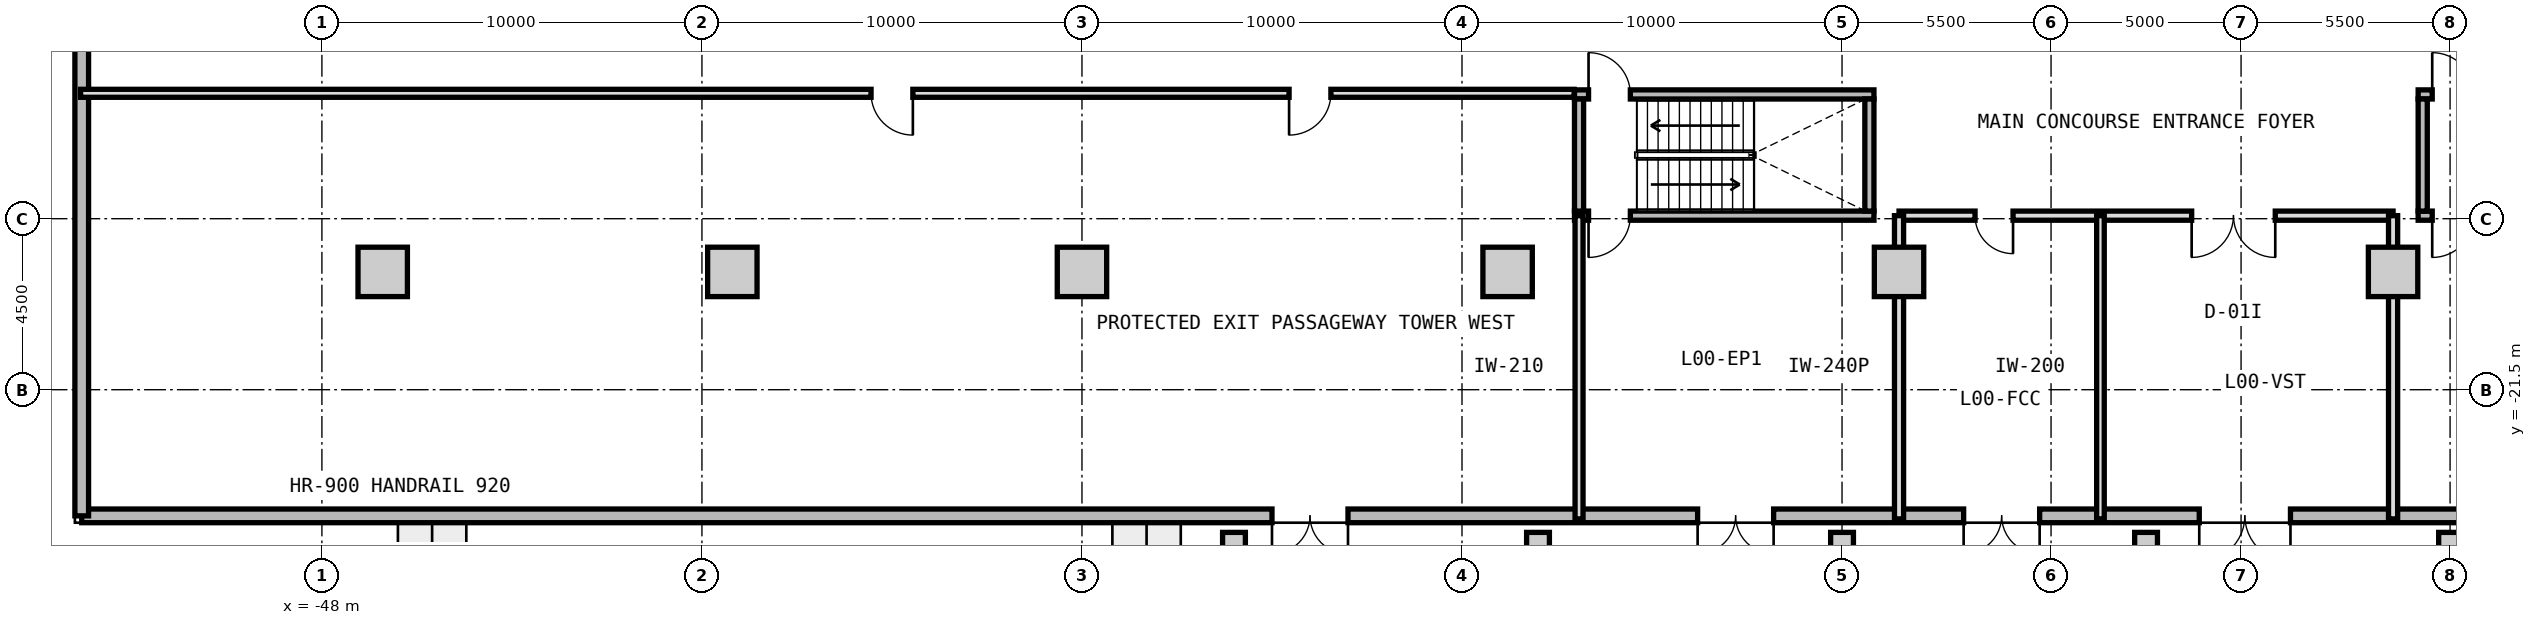
"""IFC4 building model, lengths in metres.
Left out: names, types, materials, properties, quantities, classifications, styles, units other than length and angle.
Written with IfcOpenShell. Run it as: python <this file> out.ifc"""

import sys

from ifc_helpers import new_model, si_unit, direction, frame, frame_2d, origin, origin_2d, place, context, subcontext, project, spatial, rectangle, extrude, source, transform, mapped, element, fill, save


model = new_model("IFC4")
c1 = context("Model", 3, precision=1e-05, world=origin(), true_north=direction((0.0, 1.0)))
c2 = subcontext(c1, "Body", "Model", "MODEL_VIEW")
j1 = project(units=[si_unit("LENGTHUNIT", "METRE"), si_unit("PLANEANGLEUNIT", "RADIAN")], contexts=[c1])
p1 = place(None, origin())
s1 = spatial("IfcSite", under=j1, at=p1, CompositionType="ELEMENT")
p2 = place(p1, origin())
s2 = spatial("IfcBuilding", under=s1, at=p2, CompositionType="ELEMENT")
p3 = place(p2, origin())
s3 = spatial("IfcBuildingStorey", under=s2, at=p3, CompositionType="ELEMENT", Elevation=0.0)
m1 = source(origin(), c2, "Body", "SweptSolid", [
    extrude(rectangle(XDim=1.3, YDim=1.3, at=origin_2d()), origin(), (0.0, 0.0, 1.0), 4.2),
])
for number, where, z_axis, x_axis in (
    (1, (-46.4, -18.4, 0.0), (0.0, 0.0, 1.0), (1.0, 0.0, 0.0)),
    (2, (-37.2, -18.4, 0.0), (0.0, 0.0, 1.0), (1.0, 0.0, 0.0)),
    (3, (-28.0, -18.4, 0.0), (0.0, 0.0, 1.0), (1.0, 0.0, 0.0)),
    (4, (-16.8, -18.4, 0.0), (0.0, 0.0, 1.0), (1.0, 0.0, 0.0)),
    (5, (-6.5, -18.4, 0.0), (0.0, 0.0, 1.0), (1.0, 0.0, 0.0)),
    (6, (6.5, -18.4, 0.0), (0.0, 0.0, 1.0), (1.0, 0.0, 0.0)),
):
    element("IfcColumn", number, at=place(p3, frame(where, z_axis=z_axis, x_axis=x_axis)), inside=s3, PredefinedType="COLUMN", context=c2, shape_type="MappedRepresentation", body=[
        mapped(m1, transform((0.0, 0.0, 0.0), x_axis=(1.0, 0.0, 0.0), y_axis=(0.0, 1.0, 0.0), z_axis=(0.0, 0.0, 1.0), scale=1.0)),
    ])
m2 = source(origin(), c2, "Body", "SweptSolid", [
    extrude(rectangle(XDim=0.6, YDim=0.45, at=origin_2d()), origin(), (0.0, 0.0, 1.0), 4.2),
])
for number, where, z_axis, x_axis in (
    (7, (-24.0, -25.48, 0.0), (0.0, 0.0, 1.0), (1.0, 0.0, 0.0)),
    (8, (-16.0, -25.48, 0.0), (0.0, 0.0, 1.0), (1.0, 0.0, 0.0)),
    (9, (-8.0, -25.48, 0.0), (0.0, 0.0, 1.0), (1.0, 0.0, 0.0)),
    (10, (0.0, -25.48, 0.0), (0.0, 0.0, 1.0), (1.0, 0.0, 0.0)),
    (11, (8.0, -25.48, 0.0), (0.0, 0.0, 1.0), (1.0, 0.0, 0.0)),
):
    element("IfcColumn", number, at=place(p3, frame(where, z_axis=z_axis, x_axis=x_axis)), inside=s3, PredefinedType="PILASTER", context=c2, shape_type="MappedRepresentation", body=[
        mapped(m2, transform((0.0, 0.0, 0.0), x_axis=(1.0, 0.0, 0.0), y_axis=(0.0, 1.0, 0.0), z_axis=(0.0, 0.0, 1.0), scale=1.0)),
    ])
m3 = source(origin(), c2, "Body", "SweptSolid", [
    extrude(rectangle(XDim=108.64, YDim=0.36, at=frame_2d((54.32, 0.0))), origin(), (0.0, 0.0, 1.0), 3.88),
])
p4 = place(p3, frame((54.32, -24.82, 0.0), z_axis=(0.0, 0.0, 1.0), x_axis=(-1.0, 0.0, 0.0)))
e12 = element("IfcWall", 12, at=p4, inside=s3, PredefinedType="SOLIDWALL", context=c2, shape_type="MappedRepresentation", body=[
    mapped(m3, transform((0.0, 0.0, 0.0), x_axis=(1.0, 0.0, 0.0), y_axis=(0.0, 1.0, 0.0), z_axis=(0.0, 0.0, 1.0), scale=1.0)),
])
p5 = place(p4, frame((50.52, 0.0, 0.0)))
e13 = element("IfcOpeningElement", 13, at=p5, cuts=e12, PredefinedType="OPENING", context=c2, shape_type="SweptSolid", body=[
    extrude(rectangle(XDim=2.4, YDim=2.6, at=frame_2d((1.2, 1.3))), frame((0.0, 0.19, 0.0), z_axis=(0.0, -1.0, 0.0), x_axis=(1.0, 0.0, 0.0)), (0.0, 0.0, 1.0), 0.38),
])
p6 = place(p4, frame((57.12, 0.0, 0.0)))
e14 = element("IfcOpeningElement", 14, at=p6, cuts=e12, PredefinedType="OPENING", context=c2, shape_type="SweptSolid", body=[
    extrude(rectangle(XDim=2.0, YDim=2.3, at=frame_2d((1.0, 1.15))), frame((0.0, 0.19, 0.0), z_axis=(0.0, -1.0, 0.0), x_axis=(1.0, 0.0, 0.0)), (0.0, 0.0, 1.0), 0.38),
])
p7 = place(p4, frame((42.52, 0.0, 0.0)))
e15 = element("IfcOpeningElement", 15, at=p7, cuts=e12, PredefinedType="OPENING", context=c2, shape_type="SweptSolid", body=[
    extrude(rectangle(XDim=2.0, YDim=2.3, at=frame_2d((1.0, 1.15))), frame((0.0, 0.19, 0.0), z_axis=(0.0, -1.0, 0.0), x_axis=(1.0, 0.0, 0.0)), (0.0, 0.0, 1.0), 0.38),
])
p8 = place(p4, frame((64.12, 0.0, 0.0)))
e16 = element("IfcOpeningElement", 16, at=p8, cuts=e12, PredefinedType="OPENING", context=c2, shape_type="SweptSolid", body=[
    extrude(rectangle(XDim=2.0, YDim=2.3, at=frame_2d((1.0, 1.15))), frame((0.0, 0.19, 0.0), z_axis=(0.0, -1.0, 0.0), x_axis=(1.0, 0.0, 0.0)), (0.0, 0.0, 1.0), 0.38),
])
p9 = place(p4, frame((75.32, 0.0, 0.0)))
e17 = element("IfcOpeningElement", 17, at=p9, cuts=e12, PredefinedType="OPENING", context=c2, shape_type="SweptSolid", body=[
    extrude(rectangle(XDim=2.0, YDim=2.3, at=frame_2d((1.0, 1.15))), frame((0.0, 0.19, 0.0), z_axis=(0.0, -1.0, 0.0), x_axis=(1.0, 0.0, 0.0)), (0.0, 0.0, 1.0), 0.38),
])
p10 = place(p4, frame((34.12, 0.0, 0.0)))
e18 = element("IfcOpeningElement", 18, at=p10, cuts=e12, PredefinedType="OPENING", context=c2, shape_type="SweptSolid", body=[
    extrude(rectangle(XDim=2.0, YDim=2.3, at=frame_2d((1.0, 1.15))), frame((0.0, 0.19, 0.0), z_axis=(0.0, -1.0, 0.0), x_axis=(1.0, 0.0, 0.0)), (0.0, 0.0, 1.0), 0.38),
])
m4 = source(origin(), c2, "Body", "SweptSolid", [
    extrude(rectangle(XDim=49.64, YDim=0.36, at=frame_2d((24.82, 0.0))), origin(), (0.0, 0.0, 1.0), 3.88),
])
p11 = place(p3, frame((-54.32, -24.82, 0.0), z_axis=(0.0, 0.0, 1.0), x_axis=(0.0, 1.0, 0.0)))
e19 = element("IfcWall", 19, at=p11, inside=s3, PredefinedType="SOLIDWALL", context=c2, shape_type="MappedRepresentation", body=[
    mapped(m4, transform((0.0, 0.0, 0.0), x_axis=(1.0, 0.0, 0.0), y_axis=(0.0, 1.0, 0.0), z_axis=(0.0, 0.0, 1.0), scale=1.0)),
])
p12 = place(p11, frame((14.62, 0.0, 0.0)))
e20 = element("IfcOpeningElement", 20, at=p12, cuts=e19, PredefinedType="OPENING", context=c2, shape_type="SweptSolid", body=[
    extrude(rectangle(XDim=4.2, YDim=2.7, at=frame_2d((2.1, 1.35))), frame((0.0, 0.19, 0.0), z_axis=(0.0, -1.0, 0.0), x_axis=(1.0, 0.0, 0.0)), (0.0, 0.0, 1.0), 0.38),
])
p13 = place(p11, frame((35.12, 0.0, 0.0)))
e21 = element("IfcOpeningElement", 21, at=p13, cuts=e19, PredefinedType="OPENING", context=c2, shape_type="SweptSolid", body=[
    extrude(rectangle(XDim=4.2, YDim=2.7, at=frame_2d((2.1, 1.35))), frame((0.0, 0.19, 0.0), z_axis=(0.0, -1.0, 0.0), x_axis=(1.0, 0.0, 0.0)), (0.0, 0.0, 1.0), 0.38),
])
m5 = source(origin(), c2, "Body", "SweptSolid", [
    extrude(rectangle(XDim=7.88, YDim=0.24, at=frame_2d((3.94, 0.0))), origin(), (0.0, 0.0, 1.0), 3.88),
])
p14 = place(p3, frame((-15.04, -13.73, 0.0), z_axis=(0.0, 0.0, 1.0), x_axis=(1.0, 0.0, 0.0)))
e22 = element("IfcWall", 22, at=p14, inside=s3, PredefinedType="PARTITIONING", context=c2, shape_type="MappedRepresentation", body=[
    mapped(m5, transform((0.0, 0.0, 0.0), x_axis=(1.0, 0.0, 0.0), y_axis=(0.0, 1.0, 0.0), z_axis=(0.0, 0.0, 1.0), scale=1.0)),
])
p15 = place(p14, frame((0.37, 0.0, 0.0)))
e23 = element("IfcOpeningElement", 23, at=p15, cuts=e22, PredefinedType="OPENING", context=c2, shape_type="SweptSolid", body=[
    extrude(rectangle(XDim=1.1, YDim=2.15, at=frame_2d((0.55, 1.075))), frame((0.0, 0.13, 0.0), z_axis=(0.0, -1.0, 0.0), x_axis=(1.0, 0.0, 0.0)), (0.0, 0.0, 1.0), 0.26),
])
p16 = place(p3, frame((-15.04, -16.92, 0.0), z_axis=(0.0, 0.0, 1.0), x_axis=(1.0, 0.0, 0.0)))
e24 = element("IfcWall", 24, at=p16, inside=s3, PredefinedType="PARTITIONING", context=c2, shape_type="MappedRepresentation", body=[
    mapped(m5, transform((0.0, 0.0, 0.0), x_axis=(1.0, 0.0, 0.0), y_axis=(0.0, 1.0, 0.0), z_axis=(0.0, 0.0, 1.0), scale=1.0)),
])
p17 = place(p16, frame((0.37, 0.0, 0.0)))
e25 = element("IfcOpeningElement", 25, at=p17, cuts=e24, PredefinedType="OPENING", context=c2, shape_type="SweptSolid", body=[
    extrude(rectangle(XDim=1.1, YDim=2.15, at=frame_2d((0.55, 1.075))), frame((0.0, 0.13, 0.0), z_axis=(0.0, -1.0, 0.0), x_axis=(1.0, 0.0, 0.0)), (0.0, 0.0, 1.0), 0.26),
])
m6 = source(origin(), c2, "Body", "SweptSolid", [
    extrude(rectangle(XDim=2.95, YDim=0.24, at=frame_2d((1.475, 0.0))), origin(), (0.0, 0.0, 1.0), 3.88),
])
for number, where, z_axis, x_axis in (
    (26, (-14.92, -16.8, 0.0), (0.0, 0.0, 1.0), (0.0, 1.0, 0.0)),
    (27, (-7.28, -16.8, 0.0), (0.0, 0.0, 1.0), (0.0, 1.0, 0.0)),
):
    element("IfcWall", number, at=place(p3, frame(where, z_axis=z_axis, x_axis=x_axis)), inside=s3, PredefinedType="PARTITIONING", context=c2, shape_type="MappedRepresentation", body=[
        mapped(m6, transform((0.0, 0.0, 0.0), x_axis=(1.0, 0.0, 0.0), y_axis=(0.0, 1.0, 0.0), z_axis=(0.0, 0.0, 1.0), scale=1.0)),
    ])
p18 = place(p3, frame((7.16, -13.73, 0.0), z_axis=(0.0, 0.0, 1.0), x_axis=(1.0, 0.0, 0.0)))
e28 = element("IfcWall", 28, at=p18, inside=s3, PredefinedType="PARTITIONING", context=c2, shape_type="MappedRepresentation", body=[
    mapped(m5, transform((0.0, 0.0, 0.0), x_axis=(1.0, 0.0, 0.0), y_axis=(0.0, 1.0, 0.0), z_axis=(0.0, 0.0, 1.0), scale=1.0)),
])
p19 = place(p18, frame((0.37, 0.0, 0.0)))
e29 = element("IfcOpeningElement", 29, at=p19, cuts=e28, PredefinedType="OPENING", context=c2, shape_type="SweptSolid", body=[
    extrude(rectangle(XDim=1.1, YDim=2.15, at=frame_2d((0.55, 1.075))), frame((0.0, 0.13, 0.0), z_axis=(0.0, -1.0, 0.0), x_axis=(1.0, 0.0, 0.0)), (0.0, 0.0, 1.0), 0.26),
])
p20 = place(p3, frame((7.16, -16.92, 0.0), z_axis=(0.0, 0.0, 1.0), x_axis=(1.0, 0.0, 0.0)))
e30 = element("IfcWall", 30, at=p20, inside=s3, PredefinedType="PARTITIONING", context=c2, shape_type="MappedRepresentation", body=[
    mapped(m5, transform((0.0, 0.0, 0.0), x_axis=(1.0, 0.0, 0.0), y_axis=(0.0, 1.0, 0.0), z_axis=(0.0, 0.0, 1.0), scale=1.0)),
])
p21 = place(p20, frame((0.37, 0.0, 0.0)))
e31 = element("IfcOpeningElement", 31, at=p21, cuts=e30, PredefinedType="OPENING", context=c2, shape_type="SweptSolid", body=[
    extrude(rectangle(XDim=1.1, YDim=2.15, at=frame_2d((0.55, 1.075))), frame((0.0, 0.13, 0.0), z_axis=(0.0, -1.0, 0.0), x_axis=(1.0, 0.0, 0.0)), (0.0, 0.0, 1.0), 0.26),
])
p22 = place(p3, frame((7.28, -16.8, 0.0), z_axis=(0.0, 0.0, 1.0), x_axis=(0.0, 1.0, 0.0)))
e32 = element("IfcWall", 32, at=p22, inside=s3, PredefinedType="PARTITIONING", context=c2, shape_type="MappedRepresentation", body=[
    mapped(m6, transform((0.0, 0.0, 0.0), x_axis=(1.0, 0.0, 0.0), y_axis=(0.0, 1.0, 0.0), z_axis=(0.0, 0.0, 1.0), scale=1.0)),
])
m7 = source(origin(), c2, "Body", "SweptSolid", [
    extrude(rectangle(XDim=13.0, YDim=0.24, at=frame_2d((6.5, 0.0))), origin(), (0.0, 0.0, 1.0), 3.865),
])
p23 = place(p3, frame((-6.5, -16.92, 0.0), z_axis=(0.0, 0.0, 1.0), x_axis=(1.0, 0.0, 0.0)))
e33 = element("IfcWall", 33, at=p23, inside=s3, PredefinedType="PARTITIONING", context=c2, shape_type="MappedRepresentation", body=[
    mapped(m7, transform((0.0, 0.0, 0.0), x_axis=(1.0, 0.0, 0.0), y_axis=(0.0, 1.0, 0.0), z_axis=(0.0, 0.0, 1.0), scale=1.0)),
])
p24 = place(p23, frame((2.0, 0.0, 0.0)))
e34 = element("IfcOpeningElement", 34, at=p24, cuts=e33, PredefinedType="OPENING", context=c2, shape_type="SweptSolid", body=[
    extrude(rectangle(XDim=1.0, YDim=2.1, at=frame_2d((0.5, 1.05))), frame((0.0, 0.13, 0.0), z_axis=(0.0, -1.0, 0.0), x_axis=(1.0, 0.0, 0.0)), (0.0, 0.0, 1.0), 0.26),
])
p25 = place(p23, frame((7.7, 0.0, 0.0)))
e35 = element("IfcOpeningElement", 35, at=p25, cuts=e33, PredefinedType="OPENING", context=c2, shape_type="SweptSolid", body=[
    extrude(rectangle(XDim=2.2, YDim=2.4, at=frame_2d((1.1, 1.2))), frame((0.0, 0.13, 0.0), z_axis=(0.0, -1.0, 0.0), x_axis=(1.0, 0.0, 0.0)), (0.0, 0.0, 1.0), 0.26),
])
m8 = source(origin(), c2, "Body", "SweptSolid", [
    extrude(rectangle(XDim=7.98, YDim=0.24, at=frame_2d((3.99, 0.0))), origin(), (0.0, 0.0, 1.0), 3.215),
])
for number, where, z_axis, x_axis in (
    (36, (-6.5, -24.9, 0.0), (0.0, 0.0, 1.0), (0.0, 1.0, 0.0)),
    (37, (6.5, -24.9, 0.0), (0.0, 0.0, 1.0), (0.0, 1.0, 0.0)),
):
    element("IfcWall", number, at=place(p3, frame(where, z_axis=z_axis, x_axis=x_axis)), inside=s3, PredefinedType="PARTITIONING", context=c2, shape_type="MappedRepresentation", body=[
        mapped(m8, transform((0.0, 0.0, 0.0), x_axis=(1.0, 0.0, 0.0), y_axis=(0.0, 1.0, 0.0), z_axis=(0.0, 0.0, 1.0), scale=1.0)),
    ])
m9 = source(origin(), c2, "Body", "SweptSolid", [
    extrude(rectangle(XDim=7.98, YDim=0.2, at=frame_2d((3.99, 0.0))), origin(), (0.0, 0.0, 1.0), 3.865),
])
p26 = place(p3, frame((-1.2, -24.9, 0.0), z_axis=(0.0, 0.0, 1.0), x_axis=(0.0, 1.0, 0.0)))
e38 = element("IfcWall", 38, at=p26, inside=s3, PredefinedType="PARTITIONING", context=c2, shape_type="MappedRepresentation", body=[
    mapped(m9, transform((0.0, 0.0, 0.0), x_axis=(1.0, 0.0, 0.0), y_axis=(0.0, 1.0, 0.0), z_axis=(0.0, 0.0, 1.0), scale=1.0)),
])
m10 = source(origin(), c2, "Body", "SweptSolid", [
    extrude(rectangle(XDim=7.98, YDim=0.21, at=frame_2d((3.99, 0.0))), origin(), (0.0, 0.0, 1.0), 3.865),
])
p27 = place(p3, frame((-14.92, -24.9, 0.0), z_axis=(0.0, 0.0, 1.0), x_axis=(0.0, 1.0, 0.0)))
e39 = element("IfcWall", 39, at=p27, inside=s3, PredefinedType="PARTITIONING", context=c2, shape_type="MappedRepresentation", body=[
    mapped(m10, transform((0.0, 0.0, 0.0), x_axis=(1.0, 0.0, 0.0), y_axis=(0.0, 1.0, 0.0), z_axis=(0.0, 0.0, 1.0), scale=1.0)),
])
m11 = source(origin(), c2, "Body", "SweptSolid", [
    extrude(rectangle(XDim=39.3, YDim=0.21, at=frame_2d((19.65, 0.0))), origin(), (0.0, 0.0, 1.0), 3.865),
])
p28 = place(p3, frame((-54.35, -13.7, 0.0), z_axis=(0.0, 0.0, 1.0), x_axis=(1.0, 0.0, 0.0)))
e40 = element("IfcWall", 40, at=p28, inside=s3, PredefinedType="PARTITIONING", context=c2, shape_type="MappedRepresentation", body=[
    mapped(m11, transform((0.0, 0.0, 0.0), x_axis=(1.0, 0.0, 0.0), y_axis=(0.0, 1.0, 0.0), z_axis=(0.0, 0.0, 1.0), scale=1.0)),
])
p29 = place(p28, frame((20.8, 0.0, 0.0)))
e41 = element("IfcOpeningElement", 41, at=p29, cuts=e40, PredefinedType="OPENING", context=c2, shape_type="SweptSolid", body=[
    extrude(rectangle(XDim=1.1, YDim=2.15, at=frame_2d((0.55, 1.075))), frame((0.0, 0.115, 0.0), z_axis=(0.0, -1.0, 0.0), x_axis=(1.0, 0.0, 0.0)), (0.0, 0.0, 1.0), 0.23),
])
p30 = place(p28, frame((31.8, 0.0, 0.0)))
e42 = element("IfcOpeningElement", 42, at=p30, cuts=e40, PredefinedType="OPENING", context=c2, shape_type="SweptSolid", body=[
    extrude(rectangle(XDim=1.1, YDim=2.15, at=frame_2d((0.55, 1.075))), frame((0.0, 0.115, 0.0), z_axis=(0.0, -1.0, 0.0), x_axis=(1.0, 0.0, 0.0)), (0.0, 0.0, 1.0), 0.23),
])
m12 = source(origin(), c2, "Body", "SweptSolid", [
    extrude(rectangle(XDim=2.4, YDim=2.6, at=frame_2d((1.2, 1.3))), frame((0.0, 0.025, 0.0), z_axis=(0.0, -1.0, 0.0), x_axis=(1.0, 0.0, 0.0)), (0.0, 0.0, 1.0), 0.05),
])
p31 = place(p5, origin())
e43 = element("IfcDoor", 43, at=p31, inside=s3, OperationType="DOUBLE_DOOR_SINGLE_SWING", PredefinedType="DOOR", context=c2, shape_type="MappedRepresentation", body=[
    mapped(m12, transform((0.0, 0.0, 0.0), x_axis=(1.0, 0.0, 0.0), y_axis=(0.0, 1.0, 0.0), z_axis=(0.0, 0.0, 1.0), scale=1.0)),
])
fill(e13, e43)
m13 = source(origin(), c2, "Body", "SweptSolid", [
    extrude(rectangle(XDim=2.0, YDim=2.3, at=frame_2d((1.0, 1.15))), frame((0.0, 0.025, 0.0), z_axis=(0.0, -1.0, 0.0), x_axis=(1.0, 0.0, 0.0)), (0.0, 0.0, 1.0), 0.05),
])
p32 = place(p6, origin())
e44 = element("IfcDoor", 44, at=p32, inside=s3, OperationType="DOUBLE_DOOR_SINGLE_SWING", PredefinedType="DOOR", context=c2, shape_type="MappedRepresentation", body=[
    mapped(m13, transform((0.0, 0.0, 0.0), x_axis=(1.0, 0.0, 0.0), y_axis=(0.0, 1.0, 0.0), z_axis=(0.0, 0.0, 1.0), scale=1.0)),
])
fill(e14, e44)
p33 = place(p8, origin())
e45 = element("IfcDoor", 45, at=p33, inside=s3, OperationType="DOUBLE_DOOR_SINGLE_SWING", PredefinedType="DOOR", context=c2, shape_type="MappedRepresentation", body=[
    mapped(m13, transform((0.0, 0.0, 0.0), x_axis=(1.0, 0.0, 0.0), y_axis=(0.0, 1.0, 0.0), z_axis=(0.0, 0.0, 1.0), scale=1.0)),
])
fill(e16, e45)
p34 = place(p9, origin())
e46 = element("IfcDoor", 46, at=p34, inside=s3, OperationType="DOUBLE_DOOR_SINGLE_SWING", PredefinedType="DOOR", context=c2, shape_type="MappedRepresentation", body=[
    mapped(m13, transform((0.0, 0.0, 0.0), x_axis=(1.0, 0.0, 0.0), y_axis=(0.0, 1.0, 0.0), z_axis=(0.0, 0.0, 1.0), scale=1.0)),
])
fill(e17, e46)
m14 = source(origin(), c2, "Body", "SweptSolid", [
    extrude(rectangle(XDim=1.1, YDim=2.15, at=frame_2d((0.55, 1.075))), frame((0.0, 0.025, 0.0), z_axis=(0.0, -1.0, 0.0), x_axis=(1.0, 0.0, 0.0)), (0.0, 0.0, 1.0), 0.05),
])
p35 = place(p15, origin())
e47 = element("IfcDoor", 47, at=p35, inside=s3, OperationType="SINGLE_SWING_LEFT", PredefinedType="DOOR", context=c2, shape_type="MappedRepresentation", body=[
    mapped(m14, transform((0.0, 0.0, 0.0), x_axis=(1.0, 0.0, 0.0), y_axis=(0.0, 1.0, 0.0), z_axis=(0.0, 0.0, 1.0), scale=1.0)),
])
fill(e23, e47)
p36 = place(p17, frame((1.1, 0.0, 0.0), z_axis=(0.0, 0.0, 1.0), x_axis=(-1.0, 0.0, 0.0)))
e48 = element("IfcDoor", 48, at=p36, inside=s3, OperationType="SINGLE_SWING_RIGHT", PredefinedType="DOOR", context=c2, shape_type="MappedRepresentation", body=[
    mapped(m14, transform((0.0, 0.0, 0.0), x_axis=(1.0, 0.0, 0.0), y_axis=(0.0, 1.0, 0.0), z_axis=(0.0, 0.0, 1.0), scale=1.0)),
])
fill(e25, e48)
p37 = place(p19, origin())
e49 = element("IfcDoor", 49, at=p37, inside=s3, OperationType="SINGLE_SWING_LEFT", PredefinedType="DOOR", context=c2, shape_type="MappedRepresentation", body=[
    mapped(m14, transform((0.0, 0.0, 0.0), x_axis=(1.0, 0.0, 0.0), y_axis=(0.0, 1.0, 0.0), z_axis=(0.0, 0.0, 1.0), scale=1.0)),
])
fill(e29, e49)
p38 = place(p21, frame((1.1, 0.0, 0.0), z_axis=(0.0, 0.0, 1.0), x_axis=(-1.0, 0.0, 0.0)))
e50 = element("IfcDoor", 50, at=p38, inside=s3, OperationType="SINGLE_SWING_RIGHT", PredefinedType="DOOR", context=c2, shape_type="MappedRepresentation", body=[
    mapped(m14, transform((0.0, 0.0, 0.0), x_axis=(1.0, 0.0, 0.0), y_axis=(0.0, 1.0, 0.0), z_axis=(0.0, 0.0, 1.0), scale=1.0)),
])
fill(e31, e50)
m15 = source(origin(), c2, "Body", "SweptSolid", [
    extrude(rectangle(XDim=1.0, YDim=2.1, at=frame_2d((0.5, 1.05))), frame((0.0, 0.025, 0.0), z_axis=(0.0, -1.0, 0.0), x_axis=(1.0, 0.0, 0.0)), (0.0, 0.0, 1.0), 0.05),
])
p39 = place(p24, frame((1.0, 0.0, 0.0), z_axis=(0.0, 0.0, 1.0), x_axis=(-1.0, 0.0, 0.0)))
e51 = element("IfcDoor", 51, at=p39, inside=s3, OperationType="SINGLE_SWING_LEFT", PredefinedType="DOOR", context=c2, shape_type="MappedRepresentation", body=[
    mapped(m15, transform((0.0, 0.0, 0.0), x_axis=(1.0, 0.0, 0.0), y_axis=(0.0, 1.0, 0.0), z_axis=(0.0, 0.0, 1.0), scale=1.0)),
])
fill(e34, e51)
m16 = source(origin(), c2, "Body", "SweptSolid", [
    extrude(rectangle(XDim=2.2, YDim=2.4, at=frame_2d((1.1, 1.2))), frame((0.0, 0.025, 0.0), z_axis=(0.0, -1.0, 0.0), x_axis=(1.0, 0.0, 0.0)), (0.0, 0.0, 1.0), 0.05),
])
p40 = place(p25, frame((2.2, 0.0, 0.0), z_axis=(0.0, 0.0, 1.0), x_axis=(-1.0, 0.0, 0.0)))
e52 = element("IfcDoor", 52, at=p40, inside=s3, OperationType="DOUBLE_DOOR_SINGLE_SWING", PredefinedType="DOOR", context=c2, shape_type="MappedRepresentation", body=[
    mapped(m16, transform((0.0, 0.0, 0.0), x_axis=(1.0, 0.0, 0.0), y_axis=(0.0, 1.0, 0.0), z_axis=(0.0, 0.0, 1.0), scale=1.0)),
])
fill(e35, e52)
p41 = place(p29, frame((1.1, 0.0, 0.0), z_axis=(0.0, 0.0, 1.0), x_axis=(-1.0, 0.0, 0.0)))
e53 = element("IfcDoor", 53, at=p41, inside=s3, OperationType="SINGLE_SWING_LEFT", PredefinedType="DOOR", context=c2, shape_type="MappedRepresentation", body=[
    mapped(m14, transform((0.0, 0.0, 0.0), x_axis=(1.0, 0.0, 0.0), y_axis=(0.0, 1.0, 0.0), z_axis=(0.0, 0.0, 1.0), scale=1.0)),
])
fill(e41, e53)
p42 = place(p30, frame((1.1, 0.0, 0.0), z_axis=(0.0, 0.0, 1.0), x_axis=(-1.0, 0.0, 0.0)))
e54 = element("IfcDoor", 54, at=p42, inside=s3, OperationType="SINGLE_SWING_RIGHT", PredefinedType="DOOR", context=c2, shape_type="MappedRepresentation", body=[
    mapped(m14, transform((0.0, 0.0, 0.0), x_axis=(1.0, 0.0, 0.0), y_axis=(0.0, 1.0, 0.0), z_axis=(0.0, 0.0, 1.0), scale=1.0)),
])
fill(e42, e54)
save(model, sys.argv[1])
